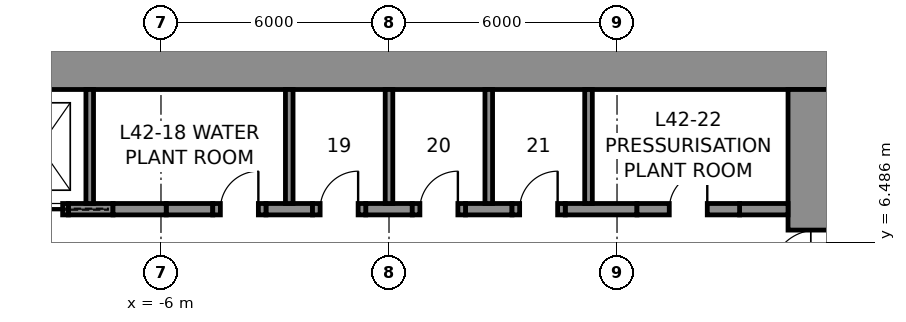
"""IFC4 building model, lengths in metres.
Left out: names, types, materials, properties, quantities, classifications, styles, units other than length and angle.
Written with IfcOpenShell. Run it as: python <this file> out.ifc"""

import sys

from ifc_helpers import new_model, si_unit, direction, frame, frame_2d, origin, place, context, subcontext, project, spatial, rectangle, extrude, element, fill, save


model = new_model("IFC4")
c1 = context("Model", 3, precision=1e-05, world=origin(), true_north=direction((0.0, 1.0)))
c2 = subcontext(c1, "Body", "Model", "MODEL_VIEW")
j1 = project(units=[si_unit("LENGTHUNIT", "METRE"), si_unit("PLANEANGLEUNIT", "RADIAN")], contexts=[c1])
p1 = place(None, origin())
s1 = spatial("IfcSite", under=j1, at=p1, CompositionType="ELEMENT")
p2 = place(p1, origin())
s2 = spatial("IfcBuilding", under=s1, at=p2, CompositionType="ELEMENT")
p3 = place(p2, frame((0.0, 0.0, 196.8)))
s3 = spatial("IfcBuildingStorey", under=s2, at=p3, CompositionType="ELEMENT", Elevation=196.8)
p4 = place(p3, frame((-12.0, 11.25, 0.0), z_axis=(0.0, 0.0, 1.0), x_axis=(1.0, 0.0, 0.0)))
e1 = element("IfcWall", 1, at=p4, inside=s3, PredefinedType="SHEAR", context=c2, shape_type="SweptSolid", body=[
    extrude(rectangle(XDim=24.0, YDim=1.5, at=frame_2d((12.0, 0.0))), origin(), (0.0, 0.0, 1.0), 5.0),
])
p5 = place(p3, frame((11.25, 10.5, 0.0), z_axis=(0.0, 0.0, 1.0), x_axis=(0.0, -1.0, 0.0)))
e2 = element("IfcWall", 2, at=p5, inside=s3, PredefinedType="SHEAR", context=c2, shape_type="SweptSolid", body=[
    extrude(rectangle(XDim=21.0, YDim=1.5, at=frame_2d((10.5, 0.0))), origin(), (0.0, 0.0, 1.0), 5.0),
])
p6 = place(p5, frame((3.7, 0.0, 0.0)))
e3 = element("IfcOpeningElement", 3, at=p6, cuts=e2, PredefinedType="OPENING", context=c2, shape_type="SweptSolid", body=[
    extrude(rectangle(XDim=1.2, YDim=2.3, at=frame_2d((0.6, 1.15))), frame((0.0, 0.76, 0.0), z_axis=(0.0, -1.0, 0.0), x_axis=(1.0, 0.0, 0.0)), (0.0, 0.0, 1.0), 1.52),
])
p7 = place(p5, frame((16.1, 0.0, 0.0)))
e4 = element("IfcOpeningElement", 4, at=p7, cuts=e2, PredefinedType="OPENING", context=c2, shape_type="SweptSolid", body=[
    extrude(rectangle(XDim=1.2, YDim=2.3, at=frame_2d((0.6, 1.15))), frame((0.0, 0.76, 0.0), z_axis=(0.0, -1.0, 0.0), x_axis=(1.0, 0.0, 0.0)), (0.0, 0.0, 1.0), 1.52),
])
p8 = place(p3, frame((-8.438, 7.35, 0.0), z_axis=(0.0, 0.0, 1.0), x_axis=(1.0, 0.0, 0.0)))
e5 = element("IfcWall", 5, at=p8, inside=s3, PredefinedType="SHEAR", context=c2, shape_type="SweptSolid", body=[
    extrude(rectangle(XDim=1.175, YDim=0.3, at=frame_2d((0.587, 0.0))), origin(), (0.0, 0.0, 1.0), 5.0),
])
for number, where, z_axis, x_axis in (
    (6, (-5.863, 7.35, 0.0), (0.0, 0.0, 1.0), (1.0, 0.0, 0.0)),
    (7, (-3.238, 7.35, 0.0), (0.0, 0.0, 1.0), (1.0, 0.0, 0.0)),
    (8, (-0.613, 7.35, 0.0), (0.0, 0.0, 1.0), (1.0, 0.0, 0.0)),
    (9, (2.012, 7.35, 0.0), (0.0, 0.0, 1.0), (1.0, 0.0, 0.0)),
):
    element("IfcWall", number, at=place(p3, frame(where, z_axis=z_axis, x_axis=x_axis)), inside=s3, PredefinedType="SHEAR", context=c2, shape_type="SweptSolid", body=[
        extrude(rectangle(XDim=1.225, YDim=0.3, at=frame_2d((0.613, 0.0))), origin(), (0.0, 0.0, 1.0), 5.0),
    ])
p9 = place(p3, frame((4.637, 7.35, 0.0), z_axis=(0.0, 0.0, 1.0), x_axis=(1.0, 0.0, 0.0)))
e10 = element("IfcWall", 10, at=p9, inside=s3, PredefinedType="SHEAR", context=c2, shape_type="SweptSolid", body=[
    extrude(rectangle(XDim=1.887, YDim=0.3, at=frame_2d((0.944, 0.0))), origin(), (0.0, 0.0, 1.0), 5.0),
])
p10 = place(p3, frame((9.225, 7.35, 0.0), z_axis=(0.0, 0.0, 1.0), x_axis=(1.0, 0.0, 0.0)))
e11 = element("IfcWall", 11, at=p10, inside=s3, PredefinedType="SHEAR", context=c2, shape_type="SweptSolid", body=[
    extrude(rectangle(XDim=1.275, YDim=0.3, at=frame_2d((0.637, 0.0))), origin(), (0.0, 0.0, 1.0), 5.0),
])
p11 = place(p3, frame((-9.938, 7.35, 0.0), z_axis=(0.0, 0.0, 1.0), x_axis=(1.0, 0.0, 0.0)))
e12 = element("IfcWall", 12, at=p11, inside=s3, PredefinedType="PARTITIONING", context=c2, shape_type="SweptSolid", body=[
    extrude(rectangle(XDim=1.5, YDim=0.3, at=frame_2d((0.75, 0.0))), origin(), (0.0, 0.0, 1.0), 5.0),
])
p12 = place(p11, frame((0.15, 0.0, 0.0)))
e13 = element("IfcOpeningElement", 13, at=p12, cuts=e12, PredefinedType="OPENING", context=c2, shape_type="SweptSolid", body=[
    extrude(rectangle(XDim=1.2, YDim=2.3, at=frame_2d((0.6, 1.15))), frame((0.0, 0.16, 0.0), z_axis=(0.0, -1.0, 0.0), x_axis=(1.0, 0.0, 0.0)), (0.0, 0.0, 1.0), 0.32),
])
p13 = place(p3, frame((-7.262, 7.35, 0.0), z_axis=(0.0, 0.0, 1.0), x_axis=(1.0, 0.0, 0.0)))
e14 = element("IfcWall", 14, at=p13, inside=s3, PredefinedType="PARTITIONING", context=c2, shape_type="SweptSolid", body=[
    extrude(rectangle(XDim=1.4, YDim=0.3, at=frame_2d((0.7, 0.0))), origin(), (0.0, 0.0, 1.0), 5.0),
])
p14 = place(p3, frame((-4.637, 7.35, 0.0), z_axis=(0.0, 0.0, 1.0), x_axis=(1.0, 0.0, 0.0)))
e15 = element("IfcWall", 15, at=p14, inside=s3, PredefinedType="PARTITIONING", context=c2, shape_type="SweptSolid", body=[
    extrude(rectangle(XDim=1.4, YDim=0.3, at=frame_2d((0.7, 0.0))), origin(), (0.0, 0.0, 1.0), 5.0),
])
p15 = place(p14, frame((0.2, 0.0, 0.0)))
e16 = element("IfcOpeningElement", 16, at=p15, cuts=e15, PredefinedType="OPENING", context=c2, shape_type="SweptSolid", body=[
    extrude(rectangle(XDim=1.0, YDim=2.3, at=frame_2d((0.5, 1.15))), frame((0.0, 0.16, 0.0), z_axis=(0.0, -1.0, 0.0), x_axis=(1.0, 0.0, 0.0)), (0.0, 0.0, 1.0), 0.32),
])
p16 = place(p3, frame((-2.012, 7.35, 0.0), z_axis=(0.0, 0.0, 1.0), x_axis=(1.0, 0.0, 0.0)))
e17 = element("IfcWall", 17, at=p16, inside=s3, PredefinedType="PARTITIONING", context=c2, shape_type="SweptSolid", body=[
    extrude(rectangle(XDim=1.4, YDim=0.3, at=frame_2d((0.7, 0.0))), origin(), (0.0, 0.0, 1.0), 5.0),
])
p17 = place(p16, frame((0.2, 0.0, 0.0)))
e18 = element("IfcOpeningElement", 18, at=p17, cuts=e17, PredefinedType="OPENING", context=c2, shape_type="SweptSolid", body=[
    extrude(rectangle(XDim=1.0, YDim=2.3, at=frame_2d((0.5, 1.15))), frame((0.0, 0.16, 0.0), z_axis=(0.0, -1.0, 0.0), x_axis=(1.0, 0.0, 0.0)), (0.0, 0.0, 1.0), 0.32),
])
p18 = place(p3, frame((0.613, 7.35, 0.0), z_axis=(0.0, 0.0, 1.0), x_axis=(1.0, 0.0, 0.0)))
e19 = element("IfcWall", 19, at=p18, inside=s3, PredefinedType="PARTITIONING", context=c2, shape_type="SweptSolid", body=[
    extrude(rectangle(XDim=1.4, YDim=0.3, at=frame_2d((0.7, 0.0))), origin(), (0.0, 0.0, 1.0), 5.0),
])
p19 = place(p18, frame((0.2, 0.0, 0.0)))
e20 = element("IfcOpeningElement", 20, at=p19, cuts=e19, PredefinedType="OPENING", context=c2, shape_type="SweptSolid", body=[
    extrude(rectangle(XDim=1.0, YDim=2.3, at=frame_2d((0.5, 1.15))), frame((0.0, 0.16, 0.0), z_axis=(0.0, -1.0, 0.0), x_axis=(1.0, 0.0, 0.0)), (0.0, 0.0, 1.0), 0.32),
])
p20 = place(p3, frame((3.238, 7.35, 0.0), z_axis=(0.0, 0.0, 1.0), x_axis=(1.0, 0.0, 0.0)))
e21 = element("IfcWall", 21, at=p20, inside=s3, PredefinedType="PARTITIONING", context=c2, shape_type="SweptSolid", body=[
    extrude(rectangle(XDim=1.4, YDim=0.3, at=frame_2d((0.7, 0.0))), origin(), (0.0, 0.0, 1.0), 5.0),
])
p21 = place(p20, frame((0.2, 0.0, 0.0)))
e22 = element("IfcOpeningElement", 22, at=p21, cuts=e21, PredefinedType="OPENING", context=c2, shape_type="SweptSolid", body=[
    extrude(rectangle(XDim=1.0, YDim=2.3, at=frame_2d((0.5, 1.15))), frame((0.0, 0.16, 0.0), z_axis=(0.0, -1.0, 0.0), x_axis=(1.0, 0.0, 0.0)), (0.0, 0.0, 1.0), 0.32),
])
p22 = place(p3, frame((6.525, 7.35, 0.0), z_axis=(0.0, 0.0, 1.0), x_axis=(1.0, 0.0, 0.0)))
e23 = element("IfcWall", 23, at=p22, inside=s3, PredefinedType="PARTITIONING", context=c2, shape_type="SweptSolid", body=[
    extrude(rectangle(XDim=2.7, YDim=0.3, at=frame_2d((1.35, 0.0))), origin(), (0.0, 0.0, 1.0), 5.0),
])
p23 = place(p22, frame((0.85, 0.0, 0.0)))
e24 = element("IfcOpeningElement", 24, at=p23, cuts=e23, PredefinedType="OPENING", context=c2, shape_type="SweptSolid", body=[
    extrude(rectangle(XDim=1.0, YDim=2.3, at=frame_2d((0.5, 1.15))), frame((0.0, 0.16, 0.0), z_axis=(0.0, -1.0, 0.0), x_axis=(1.0, 0.0, 0.0)), (0.0, 0.0, 1.0), 0.32),
])
for number, where, z_axis, x_axis in (
    (25, (-7.875, 7.5, 0.0), (0.0, 0.0, 1.0), (0.0, 1.0, 0.0)),
    (26, (-2.625, 7.5, 0.0), (0.0, 0.0, 1.0), (0.0, 1.0, 0.0)),
    (27, (0.0, 7.5, 0.0), (0.0, 0.0, 1.0), (0.0, 1.0, 0.0)),
    (28, (2.625, 7.5, 0.0), (0.0, 0.0, 1.0), (0.0, 1.0, 0.0)),
    (29, (5.25, 7.5, 0.0), (0.0, 0.0, 1.0), (0.0, 1.0, 0.0)),
):
    element("IfcWall", number, at=place(p3, frame(where, z_axis=z_axis, x_axis=x_axis)), inside=s3, PredefinedType="PARTITIONING", context=c2, shape_type="SweptSolid", body=[
        extrude(rectangle(XDim=3.0, YDim=0.2, at=frame_2d((1.5, 0.0))), origin(), (0.0, 0.0, 1.0), 5.0),
    ])
p24 = place(p15, origin())
e30 = element("IfcDoor", 30, at=p24, inside=s3, OperationType="SINGLE_SWING_RIGHT", PredefinedType="DOOR", context=c2, shape_type="SweptSolid", body=[
    extrude(rectangle(XDim=1.0, YDim=2.3, at=frame_2d((0.5, 1.15))), frame((0.0, 0.025, 0.0), z_axis=(0.0, -1.0, 0.0), x_axis=(1.0, 0.0, 0.0)), (0.0, 0.0, 1.0), 0.05),
])
fill(e16, e30)
p25 = place(p17, origin())
e31 = element("IfcDoor", 31, at=p25, inside=s3, OperationType="SINGLE_SWING_RIGHT", PredefinedType="DOOR", context=c2, shape_type="SweptSolid", body=[
    extrude(rectangle(XDim=1.0, YDim=2.3, at=frame_2d((0.5, 1.15))), frame((0.0, 0.025, 0.0), z_axis=(0.0, -1.0, 0.0), x_axis=(1.0, 0.0, 0.0)), (0.0, 0.0, 1.0), 0.05),
])
fill(e18, e31)
p26 = place(p19, origin())
e32 = element("IfcDoor", 32, at=p26, inside=s3, OperationType="SINGLE_SWING_RIGHT", PredefinedType="DOOR", context=c2, shape_type="SweptSolid", body=[
    extrude(rectangle(XDim=1.0, YDim=2.3, at=frame_2d((0.5, 1.15))), frame((0.0, 0.025, 0.0), z_axis=(0.0, -1.0, 0.0), x_axis=(1.0, 0.0, 0.0)), (0.0, 0.0, 1.0), 0.05),
])
fill(e20, e32)
p27 = place(p21, origin())
e33 = element("IfcDoor", 33, at=p27, inside=s3, OperationType="SINGLE_SWING_RIGHT", PredefinedType="DOOR", context=c2, shape_type="SweptSolid", body=[
    extrude(rectangle(XDim=1.0, YDim=2.3, at=frame_2d((0.5, 1.15))), frame((0.0, 0.025, 0.0), z_axis=(0.0, -1.0, 0.0), x_axis=(1.0, 0.0, 0.0)), (0.0, 0.0, 1.0), 0.05),
])
fill(e22, e33)
p28 = place(p23, origin())
e34 = element("IfcDoor", 34, at=p28, inside=s3, OperationType="SINGLE_SWING_RIGHT", PredefinedType="DOOR", context=c2, shape_type="SweptSolid", body=[
    extrude(rectangle(XDim=1.0, YDim=2.3, at=frame_2d((0.5, 1.15))), frame((0.0, 0.025, 0.0), z_axis=(0.0, -1.0, 0.0), x_axis=(1.0, 0.0, 0.0)), (0.0, 0.0, 1.0), 0.05),
])
fill(e24, e34)
p29 = place(p6, frame((1.2, 0.0, 0.0), z_axis=(0.0, 0.0, 1.0), x_axis=(-1.0, 0.0, 0.0)))
e35 = element("IfcDoor", 35, at=p29, inside=s3, OperationType="SINGLE_SWING_LEFT", PredefinedType="DOOR", context=c2, shape_type="SweptSolid", body=[
    extrude(rectangle(XDim=1.2, YDim=2.3, at=frame_2d((0.6, 1.15))), frame((0.0, 0.025, 0.0), z_axis=(0.0, -1.0, 0.0), x_axis=(1.0, 0.0, 0.0)), (0.0, 0.0, 1.0), 0.05),
])
fill(e3, e35)
p30 = place(p12, frame((1.2, 0.0, 0.0), z_axis=(0.0, 0.0, 1.0), x_axis=(-1.0, 0.0, 0.0)))
e36 = element("IfcDoor", 36, at=p30, inside=s3, OperationType="SLIDING_TO_LEFT", PredefinedType="DOOR", context=c2, shape_type="SweptSolid", body=[
    extrude(rectangle(XDim=1.2, YDim=2.3, at=frame_2d((0.6, 1.15))), frame((0.0, 0.025, 0.0), z_axis=(0.0, -1.0, 0.0), x_axis=(1.0, 0.0, 0.0)), (0.0, 0.0, 1.0), 0.05),
])
fill(e13, e36)
save(model, sys.argv[1])
